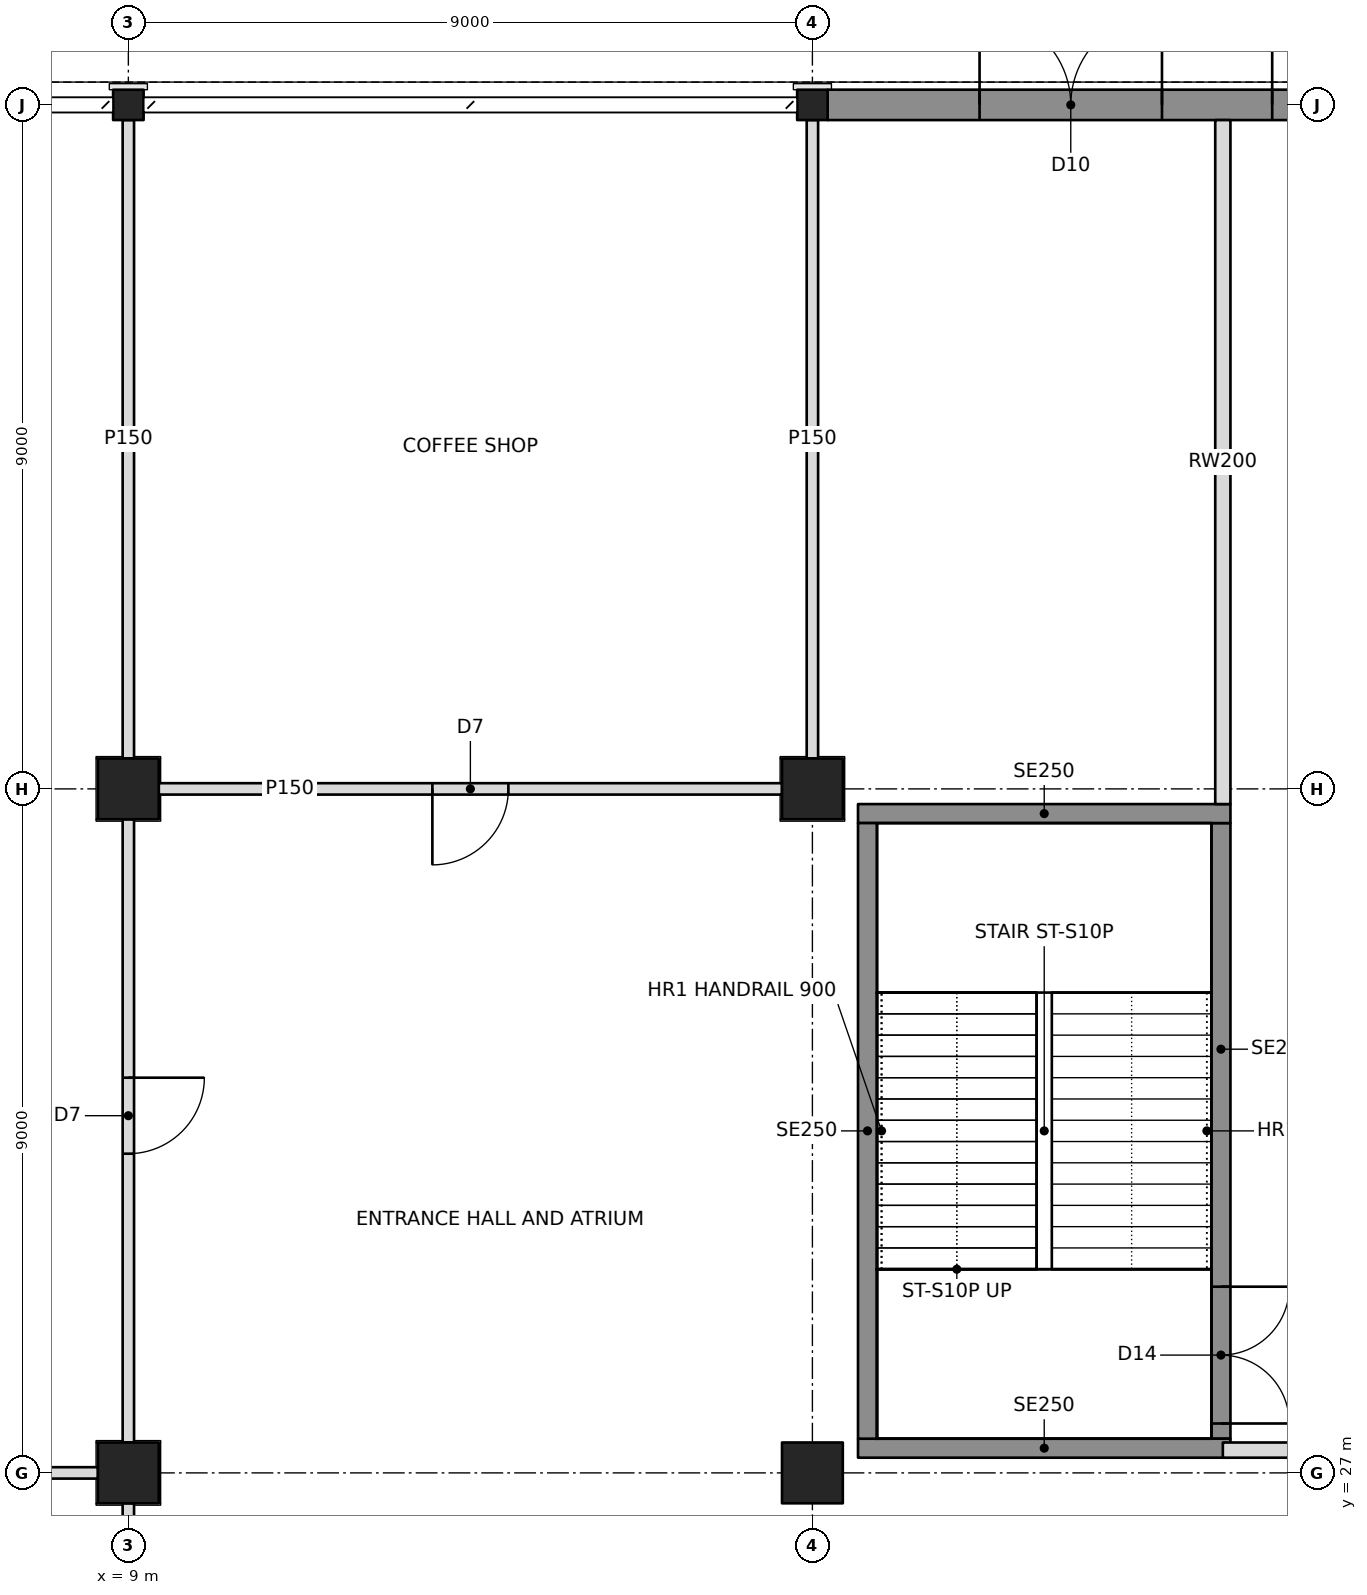
"""IFC4 building model, lengths in metres.
Left out: names, types, materials, properties, quantities, classifications, styles, units other than length and angle.
Written with IfcOpenShell. Run it as: python <this file> out.ifc"""

import sys

from ifc_helpers import new_model, si_unit, direction, frame, frame_2d, origin, origin_2d, place, context, subcontext, project, spatial, rectangle, hollow_rectangle, i_section, extrude, element, fill, save


model = new_model("IFC4")
c1 = context("Model", 3, precision=1e-05, world=origin(), true_north=direction((0.0, 1.0)))
c2 = subcontext(c1, "Body", "Model", "MODEL_VIEW")
j1 = project(units=[si_unit("LENGTHUNIT", "METRE"), si_unit("PLANEANGLEUNIT", "RADIAN")], contexts=[c1])
p1 = place(None, origin())
s1 = spatial("IfcSite", under=j1, at=p1, CompositionType="ELEMENT")
p2 = place(p1, origin())
s2 = spatial("IfcBuilding", under=s1, at=p2, CompositionType="ELEMENT")
p3 = place(p2, origin())
s3 = spatial("IfcBuildingStorey", under=s2, at=p3, CompositionType="ELEMENT", Elevation=0.0)
for number, where, z_axis, x_axis in (
    (1, (9.0, 27.0, 0.0), (0.0, 0.0, 1.0), (1.0, 0.0, 0.0)),
    (2, (9.0, 36.0, 0.0), (0.0, 0.0, 1.0), (1.0, 0.0, 0.0)),
):
    element("IfcColumn", number, at=place(p3, frame(where, z_axis=z_axis, x_axis=x_axis)), inside=s3, PredefinedType="COLUMN", context=c2, shape_type="SweptSolid", body=[
        extrude(hollow_rectangle(XDim=0.8, YDim=0.8, WallThickness=0.1, at=origin_2d()), origin(), (0.0, 0.0, 1.0), 6.0),
    ])
p4 = place(p3, frame((9.0, 45.0, 0.0), z_axis=(0.0, 0.0, 1.0), x_axis=(1.0, 0.0, 0.0)))
e3 = element("IfcColumn", 3, at=p4, inside=s3, PredefinedType="COLUMN", context=c2, shape_type="SweptSolid", body=[
    extrude(i_section(OverallWidth=0.401, OverallDepth=0.399, WebThickness=0.025, FlangeThickness=0.04, at=origin_2d()), origin(), (0.0, 0.0, 1.0), 6.0),
])
for number, where, z_axis, x_axis in (
    (4, (18.0, 27.0, 0.0), (0.0, 0.0, 1.0), (1.0, 0.0, 0.0)),
    (5, (18.0, 36.0, 0.0), (0.0, 0.0, 1.0), (1.0, 0.0, 0.0)),
):
    element("IfcColumn", number, at=place(p3, frame(where, z_axis=z_axis, x_axis=x_axis)), inside=s3, PredefinedType="COLUMN", context=c2, shape_type="SweptSolid", body=[
        extrude(hollow_rectangle(XDim=0.8, YDim=0.8, WallThickness=0.1, at=origin_2d()), origin(), (0.0, 0.0, 1.0), 6.0),
    ])
p5 = place(p3, frame((18.0, 45.0, 0.0), z_axis=(0.0, 0.0, 1.0), x_axis=(1.0, 0.0, 0.0)))
e6 = element("IfcColumn", 6, at=p5, inside=s3, PredefinedType="COLUMN", context=c2, shape_type="SweptSolid", body=[
    extrude(i_section(OverallWidth=0.401, OverallDepth=0.399, WebThickness=0.025, FlangeThickness=0.04, at=origin_2d()), origin(), (0.0, 0.0, 1.0), 6.0),
])
p6 = place(p3, frame((26.799, 45.0, 0.0), z_axis=(0.0, 0.0, 1.0), x_axis=(-1.0, 0.0, 0.0)))
e7 = element("IfcWall", 7, at=p6, inside=s3, PredefinedType="SOLIDWALL", context=c2, shape_type="SweptSolid", body=[
    extrude(rectangle(XDim=8.599, YDim=0.4, at=frame_2d((4.299, 0.0))), origin(), (0.0, 0.0, 1.0), 5.054),
])
p7 = place(p6, frame((0.35, 0.0, 0.0)))
e8 = element("IfcOpeningElement", 8, at=p7, cuts=e7, PredefinedType="OPENING", context=c2, shape_type="SweptSolid", body=[
    extrude(rectangle(XDim=2.4, YDim=2.7, at=frame_2d((1.2, 1.35))), frame((0.0, 0.21, 0.0), z_axis=(0.0, -1.0, 0.0), x_axis=(1.0, 0.0, 0.0)), (0.0, 0.0, 1.0), 0.42),
])
p8 = place(p6, frame((4.2, 0.0, 0.0)))
e9 = element("IfcOpeningElement", 9, at=p8, cuts=e7, PredefinedType="OPENING", context=c2, shape_type="SweptSolid", body=[
    extrude(rectangle(XDim=2.4, YDim=2.7, at=frame_2d((1.2, 1.35))), frame((0.0, 0.21, 0.0), z_axis=(0.0, -1.0, 0.0), x_axis=(1.0, 0.0, 0.0)), (0.0, 0.0, 1.0), 0.42),
])
p9 = place(p3, frame((0.4, 27.0, 0.0), z_axis=(0.0, 0.0, 1.0), x_axis=(1.0, 0.0, 0.0)))
e10 = element("IfcWall", 10, at=p9, inside=s3, PredefinedType="PARTITIONING", context=c2, shape_type="SweptSolid", body=[
    extrude(rectangle(XDim=8.2, YDim=0.15, at=frame_2d((4.1, 0.0))), origin(), (0.0, 0.0, 1.0), 4.892),
])
p10 = place(p3, frame((9.0, 26.6, 0.0), z_axis=(0.0, 0.0, 1.0), x_axis=(0.0, -1.0, 0.0)))
e11 = element("IfcWall", 11, at=p10, inside=s3, PredefinedType="PARTITIONING", context=c2, shape_type="SweptSolid", body=[
    extrude(rectangle(XDim=4.1, YDim=0.15, at=frame_2d((2.05, 0.0))), origin(), (0.0, 0.0, 1.0), 4.892),
])
p11 = place(p10, frame((1.1, 0.0, 0.0)))
e12 = element("IfcOpeningElement", 12, at=p11, cuts=e11, PredefinedType="OPENING", context=c2, shape_type="SweptSolid", body=[
    extrude(rectangle(XDim=1.0, YDim=2.1, at=frame_2d((0.5, 1.05))), frame((0.0, 0.085, 0.0), z_axis=(0.0, -1.0, 0.0), x_axis=(1.0, 0.0, 0.0)), (0.0, 0.0, 1.0), 0.17),
])
p12 = place(p3, frame((9.0, 35.6, 0.0), z_axis=(0.0, 0.0, 1.0), x_axis=(0.0, -1.0, 0.0)))
e13 = element("IfcWall", 13, at=p12, inside=s3, PredefinedType="PARTITIONING", context=c2, shape_type="SweptSolid", body=[
    extrude(rectangle(XDim=8.2, YDim=0.15, at=frame_2d((4.1, 0.0))), origin(), (0.0, 0.0, 1.0), 4.892),
])
p13 = place(p12, frame((3.4, 0.0, 0.0)))
e14 = element("IfcOpeningElement", 14, at=p13, cuts=e13, PredefinedType="OPENING", context=c2, shape_type="SweptSolid", body=[
    extrude(rectangle(XDim=1.0, YDim=2.1, at=frame_2d((0.5, 1.05))), frame((0.0, 0.085, 0.0), z_axis=(0.0, -1.0, 0.0), x_axis=(1.0, 0.0, 0.0)), (0.0, 0.0, 1.0), 0.17),
])
p14 = place(p3, frame((17.6, 36.0, 0.0), z_axis=(0.0, 0.0, 1.0), x_axis=(-1.0, 0.0, 0.0)))
e15 = element("IfcWall", 15, at=p14, inside=s3, PredefinedType="PARTITIONING", context=c2, shape_type="SweptSolid", body=[
    extrude(rectangle(XDim=8.2, YDim=0.15, at=frame_2d((4.1, 0.0))), origin(), (0.0, 0.0, 1.0), 4.892),
])
p15 = place(p14, frame((3.6, 0.0, 0.0)))
e16 = element("IfcOpeningElement", 16, at=p15, cuts=e15, PredefinedType="OPENING", context=c2, shape_type="SweptSolid", body=[
    extrude(rectangle(XDim=1.0, YDim=2.1, at=frame_2d((0.5, 1.05))), frame((0.0, 0.085, 0.0), z_axis=(0.0, -1.0, 0.0), x_axis=(1.0, 0.0, 0.0)), (0.0, 0.0, 1.0), 0.17),
])
for number, where, z_axis, x_axis in (
    (17, (9.0, 36.4, 0.0), (0.0, 0.0, 1.0), (0.0, 1.0, 0.0)),
    (18, (18.0, 44.801, 0.0), (0.0, 0.0, 1.0), (0.0, -1.0, 0.0)),
):
    element("IfcWall", number, at=place(p3, frame(where, z_axis=z_axis, x_axis=x_axis)), inside=s3, PredefinedType="PARTITIONING", context=c2, shape_type="SweptSolid", body=[
        extrude(rectangle(XDim=8.401, YDim=0.15, at=frame_2d((4.2, 0.0))), origin(), (0.0, 0.0, 1.0), 4.892),
    ])
p16 = place(p3, frame((23.4, 27.3, 0.0), z_axis=(0.0, 0.0, 1.0), x_axis=(1.0, 0.0, 0.0)))
e19 = element("IfcWall", 19, at=p16, inside=s3, PredefinedType="PARTITIONING", context=c2, shape_type="SweptSolid", body=[
    extrude(rectangle(XDim=3.2, YDim=0.2, at=frame_2d((1.6, 0.0))), origin(), (0.0, 0.0, 1.0), 5.75),
])
p17 = place(p3, frame((23.4, 35.8, 0.0), z_axis=(0.0, 0.0, 1.0), x_axis=(0.0, 1.0, 0.0)))
e20 = element("IfcWall", 20, at=p17, inside=s3, PredefinedType="PARTITIONING", context=c2, shape_type="SweptSolid", body=[
    extrude(rectangle(XDim=9.0, YDim=0.2, at=frame_2d((4.5, 0.0))), origin(), (0.0, 0.0, 1.0), 4.891),
])
for number, where, z_axis, x_axis in (
    (21, (18.6, 27.325, 0.0), (0.0, 0.0, 1.0), (1.0, 0.0, 0.0)),
    (22, (18.6, 35.675, 0.0), (0.0, 0.0, 1.0), (1.0, 0.0, 0.0)),
):
    element("IfcWall", number, at=place(p3, frame(where, z_axis=z_axis, x_axis=x_axis)), inside=s3, PredefinedType="SOLIDWALL", context=c2, shape_type="SweptSolid", body=[
        extrude(rectangle(XDim=4.9, YDim=0.25, at=frame_2d((2.45, 0.0))), origin(), (0.0, 0.0, 1.0), 5.75),
    ])
p18 = place(p3, frame((18.725, 27.45, 0.0), z_axis=(0.0, 0.0, 1.0), x_axis=(0.0, 1.0, 0.0)))
e23 = element("IfcWall", 23, at=p18, inside=s3, PredefinedType="SOLIDWALL", context=c2, shape_type="SweptSolid", body=[
    extrude(rectangle(XDim=8.1, YDim=0.25, at=frame_2d((4.05, 0.0))), origin(), (0.0, 0.0, 1.0), 5.75),
])
p19 = place(p3, frame((23.375, 27.45, 0.0), z_axis=(0.0, 0.0, 1.0), x_axis=(0.0, 1.0, 0.0)))
e24 = element("IfcWall", 24, at=p19, inside=s3, PredefinedType="SOLIDWALL", context=c2, shape_type="SweptSolid", body=[
    extrude(rectangle(XDim=8.1, YDim=0.25, at=frame_2d((4.05, 0.0))), origin(), (0.0, 0.0, 1.0), 5.75),
])
p20 = place(p19, frame((0.2, 0.0, 0.0)))
e25 = element("IfcOpeningElement", 25, at=p20, cuts=e24, PredefinedType="OPENING", context=c2, shape_type="SweptSolid", body=[
    extrude(rectangle(XDim=1.8, YDim=2.1, at=frame_2d((0.9, 1.05))), frame((0.0, 0.135, 0.0), z_axis=(0.0, -1.0, 0.0), x_axis=(1.0, 0.0, 0.0)), (0.0, 0.0, 1.0), 0.27),
])
p21 = place(p7, frame((2.4, 0.0, 0.0), z_axis=(0.0, 0.0, 1.0), x_axis=(-1.0, 0.0, 0.0)))
e26 = element("IfcDoor", 26, at=p21, inside=s3, OperationType="DOUBLE_DOOR_SINGLE_SWING", PredefinedType="DOOR", context=c2, shape_type="SweptSolid", body=[
    extrude(rectangle(XDim=2.4, YDim=2.7, at=frame_2d((1.2, 1.35))), frame((0.0, 0.025, 0.0), z_axis=(0.0, -1.0, 0.0), x_axis=(1.0, 0.0, 0.0)), (0.0, 0.0, 1.0), 0.05),
])
fill(e8, e26)
p22 = place(p8, frame((2.4, 0.0, 0.0), z_axis=(0.0, 0.0, 1.0), x_axis=(-1.0, 0.0, 0.0)))
e27 = element("IfcDoor", 27, at=p22, inside=s3, OperationType="DOUBLE_DOOR_SINGLE_SWING", PredefinedType="DOOR", context=c2, shape_type="SweptSolid", body=[
    extrude(rectangle(XDim=2.4, YDim=2.7, at=frame_2d((1.2, 1.35))), frame((0.0, 0.025, 0.0), z_axis=(0.0, -1.0, 0.0), x_axis=(1.0, 0.0, 0.0)), (0.0, 0.0, 1.0), 0.05),
])
fill(e9, e27)
p23 = place(p15, origin())
e28 = element("IfcDoor", 28, at=p23, inside=s3, OperationType="SINGLE_SWING_RIGHT", PredefinedType="DOOR", context=c2, shape_type="SweptSolid", body=[
    extrude(rectangle(XDim=1.0, YDim=2.1, at=frame_2d((0.5, 1.05))), frame((0.0, 0.025, 0.0), z_axis=(0.0, -1.0, 0.0), x_axis=(1.0, 0.0, 0.0)), (0.0, 0.0, 1.0), 0.05),
])
fill(e16, e28)
p24 = place(p13, origin())
e29 = element("IfcDoor", 29, at=p24, inside=s3, OperationType="SINGLE_SWING_LEFT", PredefinedType="DOOR", context=c2, shape_type="SweptSolid", body=[
    extrude(rectangle(XDim=1.0, YDim=2.1, at=frame_2d((0.5, 1.05))), frame((0.0, 0.025, 0.0), z_axis=(0.0, -1.0, 0.0), x_axis=(1.0, 0.0, 0.0)), (0.0, 0.0, 1.0), 0.05),
])
fill(e14, e29)
p25 = place(p20, frame((1.8, 0.0, 0.0), z_axis=(0.0, 0.0, 1.0), x_axis=(-1.0, 0.0, 0.0)))
e30 = element("IfcDoor", 30, at=p25, inside=s3, OperationType="DOUBLE_DOOR_SINGLE_SWING", PredefinedType="DOOR", context=c2, shape_type="SweptSolid", body=[
    extrude(rectangle(XDim=1.8, YDim=2.1, at=frame_2d((0.9, 1.05))), frame((0.0, 0.025, 0.0), z_axis=(0.0, -1.0, 0.0), x_axis=(1.0, 0.0, 0.0)), (0.0, 0.0, 1.0), 0.05),
])
fill(e25, e30)
save(model, sys.argv[1])
